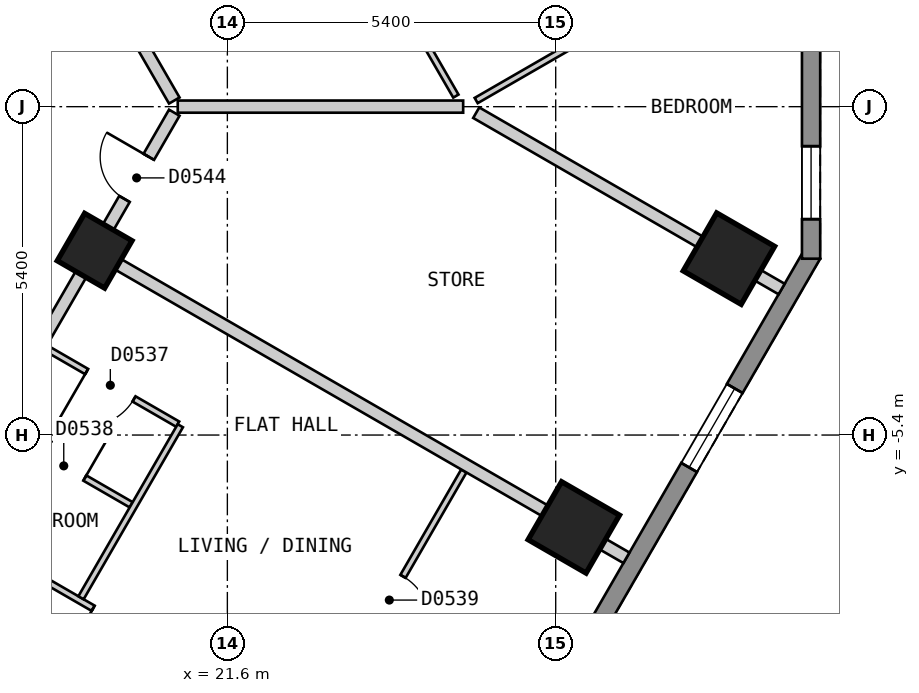
"""IFC4 building model, lengths in metres.
Left out: names, types, materials, properties, quantities, classifications, styles, units other than length and angle.
Written with IfcOpenShell. Run it as: python <this file> out.ifc"""

import sys

from ifc_helpers import new_model, si_unit, direction, frame, frame_2d, origin, origin_2d, place, context, subcontext, project, spatial, polyline, rectangle, outline, extrude, element, fill, save


model = new_model("IFC4")
c1 = context("Model", 3, precision=1e-05, world=origin(), true_north=direction((0.0, 1.0)))
c2 = subcontext(c1, "Body", "Model", "MODEL_VIEW")
j1 = project(units=[si_unit("LENGTHUNIT", "METRE"), si_unit("PLANEANGLEUNIT", "RADIAN")], contexts=[c1])
p1 = place(None, origin())
s1 = spatial("IfcSite", under=j1, at=p1, CompositionType="ELEMENT")
p2 = place(p1, origin())
s2 = spatial("IfcBuilding", under=s1, at=p2, CompositionType="ELEMENT")
p3 = place(p2, frame((0.0, 0.0, 44.4)))
s3 = spatial("IfcBuildingStorey", under=s2, at=p3, CompositionType="ELEMENT", Elevation=44.4)
for number, where, z_axis, x_axis in (
    (1, (27.298, -6.919, 0.0), (0.0, 0.0, 1.0), (0.5, 0.866, 0.0)),
    (2, (29.849, -2.499, 0.0), (0.0, 0.0, 1.0), (0.5, 0.866, 0.0)),
):
    element("IfcColumn", number, at=place(p3, frame(where, z_axis=z_axis, x_axis=x_axis)), inside=s3, PredefinedType="COLUMN", context=c2, shape_type="SweptSolid", body=[
        extrude(rectangle(XDim=1.1, YDim=1.1, at=origin_2d()), origin(), (0.0, 0.0, 1.0), 3.0),
    ])
p4 = place(p3, frame((19.417, -2.369, 0.0), z_axis=(0.0, 0.0, 1.0), x_axis=(0.499984884929, 0.866034130299, 0.0)))
e3 = element("IfcColumn", 3, at=p4, inside=s3, PredefinedType="COLUMN", context=c2, shape_type="SweptSolid", body=[
    extrude(rectangle(XDim=0.9, YDim=0.9, at=origin_2d()), origin(), (0.0, 0.0, 1.0), 3.0),
])
p5 = place(p3, frame((17.71, -25.825, 0.0), z_axis=(0.0, 0.0, 1.0), x_axis=(0.500001938803, 0.866024284413, 0.0)))
e4 = element("IfcWall", 4, at=p5, inside=s3, PredefinedType="SOLIDWALL", context=c2, shape_type="SweptSolid", body=[
    extrude(outline(polyline([(0.0, -0.15), (27.02, -0.15), (26.94, 0.15), (0.08, 0.15), (0.0, -0.15)])), origin(), (0.0, 0.0, 1.0), 2.7),
])
p6 = place(p5, frame((2.553, 0.0, 0.15)))
e5 = element("IfcOpeningElement", 5, at=p6, cuts=e4, PredefinedType="OPENING", context=c2, shape_type="SweptSolid", body=[
    extrude(rectangle(XDim=1.5, YDim=2.1, at=frame_2d((0.75, 1.05))), frame((0.0, 0.16, 0.0), z_axis=(0.0, -1.0, 0.0), x_axis=(1.0, 0.0, 0.0)), (0.0, 0.0, 1.0), 0.32),
])
p7 = place(p5, frame((7.658, 0.0, 0.15)))
e6 = element("IfcOpeningElement", 6, at=p7, cuts=e4, PredefinedType="OPENING", context=c2, shape_type="SweptSolid", body=[
    extrude(rectangle(XDim=1.5, YDim=2.1, at=frame_2d((0.75, 1.05))), frame((0.0, 0.16, 0.0), z_axis=(0.0, -1.0, 0.0), x_axis=(1.0, 0.0, 0.0)), (0.0, 0.0, 1.0), 0.32),
])
p8 = place(p5, frame((12.761, 0.0, 0.15)))
e7 = element("IfcOpeningElement", 7, at=p8, cuts=e4, PredefinedType="OPENING", context=c2, shape_type="SweptSolid", body=[
    extrude(rectangle(XDim=1.5, YDim=2.1, at=frame_2d((0.75, 1.05))), frame((0.0, 0.16, 0.0), z_axis=(0.0, -1.0, 0.0), x_axis=(1.0, 0.0, 0.0)), (0.0, 0.0, 1.0), 0.32),
])
p9 = place(p5, frame((17.865, 0.0, 0.15)))
e8 = element("IfcOpeningElement", 8, at=p9, cuts=e4, PredefinedType="OPENING", context=c2, shape_type="SweptSolid", body=[
    extrude(rectangle(XDim=1.5, YDim=2.1, at=frame_2d((0.75, 1.05))), frame((0.0, 0.16, 0.0), z_axis=(0.0, -1.0, 0.0), x_axis=(1.0, 0.0, 0.0)), (0.0, 0.0, 1.0), 0.32),
])
p10 = place(p5, frame((22.969, 0.0, 0.15)))
e9 = element("IfcOpeningElement", 9, at=p10, cuts=e4, PredefinedType="OPENING", context=c2, shape_type="SweptSolid", body=[
    extrude(rectangle(XDim=1.5, YDim=2.1, at=frame_2d((0.75, 1.05))), frame((0.0, 0.16, 0.0), z_axis=(0.0, -1.0, 0.0), x_axis=(1.0, 0.0, 0.0)), (0.0, 0.0, 1.0), 0.32),
])
p11 = place(p3, frame((31.2, -2.5, 0.0), z_axis=(0.0, 0.0, 1.0), x_axis=(0.0, 1.0, 0.0)))
e10 = element("IfcWall", 10, at=p11, inside=s3, PredefinedType="SOLIDWALL", context=c2, shape_type="SweptSolid", body=[
    extrude(outline(polyline([(0.0, -0.15), (5.0, -0.15), (4.92, 0.15), (0.08, 0.15), (0.0, -0.15)])), origin(), (0.0, 0.0, 1.0), 2.7),
])
p12 = place(p11, frame((0.65, 0.0, 0.15)))
e11 = element("IfcOpeningElement", 11, at=p12, cuts=e10, PredefinedType="OPENING", context=c2, shape_type="SweptSolid", body=[
    extrude(rectangle(XDim=1.2, YDim=2.1, at=frame_2d((0.6, 1.05))), frame((0.0, 0.16, 0.0), z_axis=(0.0, -1.0, 0.0), x_axis=(1.0, 0.0, 0.0)), (0.0, 0.0, 1.0), 0.32),
])
p13 = place(p3, frame((10.45, 17.9, 0.0), z_axis=(0.0, 0.0, 1.0), x_axis=(0.500034352617, -0.866005569383, 0.0)))
e12 = element("IfcWall", 12, at=p13, inside=s3, PredefinedType="PARTITIONING", context=c2, shape_type="SweptSolid", body=[
    extrude(rectangle(XDim=20.553, YDim=0.2, at=frame_2d((10.276, 0.0))), origin(), (0.0, 0.0, 1.0), 2.7),
])
p14 = place(p13, frame((14.902, 0.0, 0.0)))
e13 = element("IfcOpeningElement", 13, at=p14, cuts=e12, PredefinedType="OPENING", context=c2, shape_type="SweptSolid", body=[
    extrude(rectangle(XDim=1.0, YDim=2.1, at=frame_2d((0.5, 1.05))), frame((0.0, 0.11, 0.0), z_axis=(0.0, -1.0, 0.0), x_axis=(1.0, 0.0, 0.0)), (0.0, 0.0, 1.0), 0.22),
])
p15 = place(p13, frame((4.671, 0.0, 0.0)))
e14 = element("IfcOpeningElement", 14, at=p15, cuts=e12, PredefinedType="OPENING", context=c2, shape_type="SweptSolid", body=[
    extrude(rectangle(XDim=1.0, YDim=2.1, at=frame_2d((0.5, 1.05))), frame((0.0, 0.11, 0.0), z_axis=(0.0, -1.0, 0.0), x_axis=(1.0, 0.0, 0.0)), (0.0, 0.0, 1.0), 0.22),
])
p16 = place(p3, frame((15.707, -8.794, 0.0), z_axis=(0.0, 0.0, 1.0), x_axis=(0.50000451406, 0.866022797575, 0.0)))
e15 = element("IfcWall", 15, at=p16, inside=s3, PredefinedType="PARTITIONING", context=c2, shape_type="SweptSolid", body=[
    extrude(rectangle(XDim=10.04, YDim=0.2, at=frame_2d((5.02, 0.0))), origin(), (0.0, 0.0, 1.0), 2.7),
])
p17 = place(p16, frame((4.367, 0.0, 0.0)))
e16 = element("IfcOpeningElement", 16, at=p17, cuts=e15, PredefinedType="OPENING", context=c2, shape_type="SweptSolid", body=[
    extrude(rectangle(XDim=1.0, YDim=2.1, at=frame_2d((0.5, 1.05))), frame((0.0, 0.11, 0.0), z_axis=(0.0, -1.0, 0.0), x_axis=(1.0, 0.0, 0.0)), (0.0, 0.0, 1.0), 0.22),
])
p18 = place(p16, frame((8.402, 0.0, 0.0)))
e17 = element("IfcOpeningElement", 17, at=p18, cuts=e15, PredefinedType="OPENING", context=c2, shape_type="SweptSolid", body=[
    extrude(rectangle(XDim=0.8, YDim=2.1, at=frame_2d((0.4, 1.05))), frame((0.0, 0.11, 0.0), z_axis=(0.0, -1.0, 0.0), x_axis=(1.0, 0.0, 0.0)), (0.0, 0.0, 1.0), 0.22),
])
p19 = place(p3, frame((17.844, -5.292, 0.0), z_axis=(0.0, 0.0, 1.0), x_axis=(0.866038211682, -0.499977815414, 0.0)))
e18 = element("IfcWall", 18, at=p19, inside=s3, PredefinedType="PARTITIONING", context=c2, shape_type="SweptSolid", body=[
    extrude(rectangle(XDim=2.51, YDim=0.1, at=frame_2d((1.255, 0.0))), origin(), (0.0, 0.0, 1.0), 2.7),
])
p20 = place(p19, frame((0.83, 0.0, 0.0)))
e19 = element("IfcOpeningElement", 19, at=p20, cuts=e18, PredefinedType="OPENING", context=c2, shape_type="SweptSolid", body=[
    extrude(rectangle(XDim=0.8, YDim=2.1, at=frame_2d((0.4, 1.05))), frame((0.0, 0.06, 0.0), z_axis=(0.0, -1.0, 0.0), x_axis=(1.0, 0.0, 0.0)), (0.0, 0.0, 1.0), 0.12),
])
p21 = place(p3, frame((18.61, -3.966, 0.0), z_axis=(0.0, 0.0, 1.0), x_axis=(0.865958718457, -0.500115484592, 0.0)))
e20 = element("IfcWall", 20, at=p21, inside=s3, PredefinedType="PARTITIONING", context=c2, shape_type="SweptSolid", body=[
    extrude(rectangle(XDim=2.509, YDim=0.1, at=frame_2d((1.255, 0.0))), origin(), (0.0, 0.0, 1.0), 2.7),
])
p22 = place(p21, frame((0.78, 0.0, 0.0)))
e21 = element("IfcOpeningElement", 21, at=p22, cuts=e20, PredefinedType="OPENING", context=c2, shape_type="SweptSolid", body=[
    extrude(rectangle(XDim=0.9, YDim=2.1, at=frame_2d((0.45, 1.05))), frame((0.0, 0.06, 0.0), z_axis=(0.0, -1.0, 0.0), x_axis=(1.0, 0.0, 0.0)), (0.0, 0.0, 1.0), 0.12),
])
p23 = place(p3, frame((16.951, -6.839, 0.0), z_axis=(0.0, 0.0, 1.0), x_axis=(0.866022959057, -0.500004234368, 0.0)))
e22 = element("IfcWall", 22, at=p23, inside=s3, PredefinedType="PARTITIONING", context=c2, shape_type="SweptSolid", body=[
    extrude(rectangle(XDim=10.0, YDim=0.1, at=frame_2d((5.0, 0.0))), origin(), (0.0, 0.0, 1.0), 2.7),
])
p24 = place(p23, frame((4.995, 0.0, 0.0)))
e23 = element("IfcOpeningElement", 23, at=p24, cuts=e22, PredefinedType="OPENING", context=c2, shape_type="SweptSolid", body=[
    extrude(rectangle(XDim=0.9, YDim=2.1, at=frame_2d((0.45, 1.05))), frame((0.0, 0.06, 0.0), z_axis=(0.0, -1.0, 0.0), x_axis=(1.0, 0.0, 0.0)), (0.0, 0.0, 1.0), 0.12),
])
p25 = place(p23, frame((2.82, 0.0, 0.0)))
e24 = element("IfcOpeningElement", 24, at=p25, cuts=e22, PredefinedType="OPENING", context=c2, shape_type="SweptSolid", body=[
    extrude(rectangle(XDim=0.8, YDim=2.1, at=frame_2d((0.4, 1.05))), frame((0.0, 0.06, 0.0), z_axis=(0.0, -1.0, 0.0), x_axis=(1.0, 0.0, 0.0)), (0.0, 0.0, 1.0), 0.12),
])
p26 = place(p3, frame((19.193, -8.076, 0.0), z_axis=(0.0, 0.0, 1.0), x_axis=(0.499901468276, 0.866082283629, 0.0)))
e25 = element("IfcWall", 25, at=p26, inside=s3, PredefinedType="PARTITIONING", context=c2, shape_type="SweptSolid", body=[
    extrude(rectangle(XDim=3.266, YDim=0.1, at=frame_2d((1.633, 0.0))), origin(), (0.0, 0.0, 1.0), 2.7),
])
p27 = place(p3, frame((23.013, -10.281, 0.0), z_axis=(0.0, 0.0, 1.0), x_axis=(0.499881743012, 0.866093668724, 0.0)))
e26 = element("IfcWall", 26, at=p27, inside=s3, PredefinedType="PARTITIONING", context=c2, shape_type="SweptSolid", body=[
    extrude(rectangle(XDim=4.953, YDim=0.1, at=frame_2d((2.477, 0.0))), origin(), (0.0, 0.0, 1.0), 2.7),
])
p28 = place(p27, frame((2.052, 0.0, 0.0)))
e27 = element("IfcOpeningElement", 27, at=p28, cuts=e26, PredefinedType="OPENING", context=c2, shape_type="SweptSolid", body=[
    extrude(rectangle(XDim=0.9, YDim=2.1, at=frame_2d((0.45, 1.05))), frame((0.0, 0.06, 0.0), z_axis=(0.0, -1.0, 0.0), x_axis=(1.0, 0.0, 0.0)), (0.0, 0.0, 1.0), 0.12),
])
p29 = place(p3, frame((25.692, 0.101, 0.0), z_axis=(0.0, 0.0, 1.0), x_axis=(0.866116197112, 0.49984270836, 0.0)))
e28 = element("IfcWall", 28, at=p29, inside=s3, PredefinedType="PARTITIONING", context=c2, shape_type="SweptSolid", body=[
    extrude(rectangle(XDim=5.8, YDim=0.1, at=frame_2d((2.9, 0.0))), origin(), (0.0, 0.0, 1.0), 2.7),
])
p30 = place(p29, frame((2.35, 0.0, 0.0)))
e29 = element("IfcOpeningElement", 29, at=p30, cuts=e28, PredefinedType="OPENING", context=c2, shape_type="SweptSolid", body=[
    extrude(rectangle(XDim=0.9, YDim=2.1, at=frame_2d((0.45, 1.05))), frame((0.0, 0.06, 0.0), z_axis=(0.0, -1.0, 0.0), x_axis=(1.0, 0.0, 0.0)), (0.0, 0.0, 1.0), 0.12),
])
p31 = place(p3, frame((19.503, -2.419, 0.0), z_axis=(0.0, 0.0, 1.0), x_axis=(0.866022959057, -0.500004234368, 0.0)))
e30 = element("IfcWall", 30, at=p31, inside=s3, PredefinedType="PARTITIONING", context=c2, shape_type="SweptSolid", body=[
    extrude(rectangle(XDim=10.0, YDim=0.2, at=frame_2d((5.0, 0.0))), origin(), (0.0, 0.0, 1.0), 2.7),
])
p32 = place(p3, frame((25.693, -0.099, 0.0), z_axis=(0.0, 0.0, 1.0), x_axis=(0.866032775405, -0.499987231761, 0.0)))
e31 = element("IfcWall", 31, at=p32, inside=s3, PredefinedType="PARTITIONING", context=c2, shape_type="SweptSolid", body=[
    extrude(rectangle(XDim=5.8, YDim=0.2, at=frame_2d((2.9, 0.0))), origin(), (0.0, 0.0, 1.0), 2.7),
])
p33 = place(p3, frame((20.784, 0.001, 0.0), z_axis=(0.0, 0.0, 1.0), x_axis=(1.0, 0.0, 0.0)))
e32 = element("IfcWall", 32, at=p33, inside=s3, PredefinedType="PARTITIONING", context=c2, shape_type="SweptSolid", body=[
    extrude(rectangle(XDim=4.694, YDim=0.2, at=frame_2d((2.347, 0.0))), origin(), (0.0, 0.0, 1.0), 2.7),
])
p34 = place(p3, frame((22.921, 4.394, 0.0), z_axis=(0.0, 0.0, 1.0), x_axis=(0.500093956194, -0.865971151354, 0.0)))
e33 = element("IfcWall", 33, at=p34, inside=s3, PredefinedType="PARTITIONING", context=c2, shape_type="SweptSolid", body=[
    extrude(rectangle(XDim=4.873, YDim=0.1, at=frame_2d((2.437, 0.0))), origin(), (0.0, 0.0, 1.0), 2.7),
])
p35 = place(p34, frame((2.137, 0.0, 0.0)))
e34 = element("IfcOpeningElement", 34, at=p35, cuts=e33, PredefinedType="OPENING", context=c2, shape_type="SweptSolid", body=[
    extrude(rectangle(XDim=0.8, YDim=2.1, at=frame_2d((0.4, 1.05))), frame((0.0, 0.06, 0.0), z_axis=(0.0, -1.0, 0.0), x_axis=(1.0, 0.0, 0.0)), (0.0, 0.0, 1.0), 0.12),
])
p36 = place(p10, origin())
e35 = element("IfcWindow", 35, at=p36, inside=s3, PartitioningType="SINGLE_PANEL", PredefinedType="WINDOW", context=c2, shape_type="SweptSolid", body=[
    extrude(rectangle(XDim=1.5, YDim=2.1, at=frame_2d((0.75, 1.05))), frame((0.0, 0.03, 0.0), z_axis=(0.0, -1.0, 0.0), x_axis=(1.0, 0.0, 0.0)), (0.0, 0.0, 1.0), 0.06),
])
fill(e9, e35)
p37 = place(p12, origin())
e36 = element("IfcWindow", 36, at=p37, inside=s3, PartitioningType="SINGLE_PANEL", PredefinedType="WINDOW", context=c2, shape_type="SweptSolid", body=[
    extrude(rectangle(XDim=1.2, YDim=2.1, at=frame_2d((0.6, 1.05))), frame((0.0, 0.03, 0.0), z_axis=(0.0, -1.0, 0.0), x_axis=(1.0, 0.0, 0.0)), (0.0, 0.0, 1.0), 0.06),
])
fill(e11, e36)
p38 = place(p22, origin())
e37 = element("IfcDoor", 37, at=p38, inside=s3, OperationType="SINGLE_SWING_LEFT", PredefinedType="DOOR", context=c2, shape_type="SweptSolid", body=[
    extrude(rectangle(XDim=0.9, YDim=2.1, at=frame_2d((0.45, 1.05))), frame((0.0, 0.025, 0.0), z_axis=(0.0, -1.0, 0.0), x_axis=(1.0, 0.0, 0.0)), (0.0, 0.0, 1.0), 0.05),
])
fill(e21, e37)
p39 = place(p20, origin())
e38 = element("IfcDoor", 38, at=p39, inside=s3, OperationType="SINGLE_SWING_RIGHT", PredefinedType="DOOR", context=c2, shape_type="SweptSolid", body=[
    extrude(rectangle(XDim=0.8, YDim=2.1, at=frame_2d((0.4, 1.05))), frame((0.0, 0.025, 0.0), z_axis=(0.0, -1.0, 0.0), x_axis=(1.0, 0.0, 0.0)), (0.0, 0.0, 1.0), 0.05),
])
fill(e19, e38)
p40 = place(p28, origin())
e39 = element("IfcDoor", 39, at=p40, inside=s3, OperationType="SINGLE_SWING_LEFT", PredefinedType="DOOR", context=c2, shape_type="SweptSolid", body=[
    extrude(rectangle(XDim=0.9, YDim=2.1, at=frame_2d((0.45, 1.05))), frame((0.0, 0.025, 0.0), z_axis=(0.0, -1.0, 0.0), x_axis=(1.0, 0.0, 0.0)), (0.0, 0.0, 1.0), 0.05),
])
fill(e27, e39)
p41 = place(p25, origin())
e40 = element("IfcDoor", 40, at=p41, inside=s3, OperationType="SINGLE_SWING_LEFT", PredefinedType="DOOR", context=c2, shape_type="SweptSolid", body=[
    extrude(rectangle(XDim=0.8, YDim=2.1, at=frame_2d((0.4, 1.05))), frame((0.0, 0.025, 0.0), z_axis=(0.0, -1.0, 0.0), x_axis=(1.0, 0.0, 0.0)), (0.0, 0.0, 1.0), 0.05),
])
fill(e24, e40)
p42 = place(p18, origin())
e41 = element("IfcDoor", 41, at=p42, inside=s3, OperationType="SINGLE_SWING_RIGHT", PredefinedType="DOOR", context=c2, shape_type="SweptSolid", body=[
    extrude(rectangle(XDim=0.8, YDim=2.1, at=frame_2d((0.4, 1.05))), frame((0.0, 0.025, 0.0), z_axis=(0.0, -1.0, 0.0), x_axis=(1.0, 0.0, 0.0)), (0.0, 0.0, 1.0), 0.05),
])
fill(e17, e41)
save(model, sys.argv[1])
